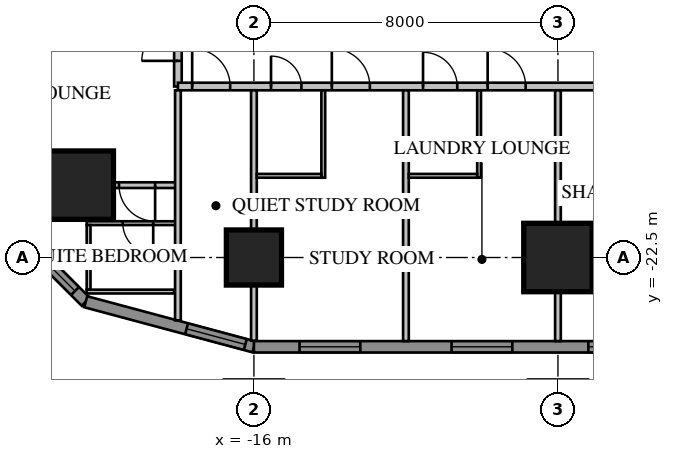
"""IFC4 building model, lengths in metres.
Left out: names, types, materials, properties, quantities, classifications, styles, units other than length and angle.
Written with IfcOpenShell. Run it as: python <this file> out.ifc"""

import sys

from ifc_helpers import new_model, si_unit, direction, frame, frame_2d, origin, origin_2d, place, context, subcontext, project, spatial, rectangle, extrude, element, fill, save


model = new_model("IFC4")
c1 = context("Model", 3, precision=1e-05, world=origin(), true_north=direction((0.0, 1.0)))
c2 = subcontext(c1, "Body", "Model", "MODEL_VIEW")
j1 = project(units=[si_unit("LENGTHUNIT", "METRE"), si_unit("PLANEANGLEUNIT", "RADIAN")], contexts=[c1])
p1 = place(None, origin())
s1 = spatial("IfcSite", under=j1, at=p1, CompositionType="ELEMENT")
p2 = place(p1, origin())
s2 = spatial("IfcBuilding", under=s1, at=p2, CompositionType="ELEMENT")
p3 = place(p2, frame((0.0, 0.0, 42.95)))
s3 = spatial("IfcBuildingStorey", under=s2, at=p3, CompositionType="ELEMENT", Elevation=42.95)
p4 = place(p3, frame((-20.596, -20.596, 0.0), z_axis=(0.0, 0.0, 1.0), x_axis=(1.0, 0.0, 0.0)))
e1 = element("IfcColumn", 1, at=p4, inside=s3, PredefinedType="COLUMN", context=c2, shape_type="SweptSolid", body=[
    extrude(rectangle(XDim=1.8, YDim=1.8, at=origin_2d()), origin(), (0.0, 0.0, 1.0), 3.85),
])
p5 = place(p3, frame((-16.0, -22.5, 0.0), z_axis=(0.0, 0.0, 1.0), x_axis=(1.0, 0.0, 0.0)))
e2 = element("IfcColumn", 2, at=p5, inside=s3, PredefinedType="COLUMN", context=c2, shape_type="SweptSolid", body=[
    extrude(rectangle(XDim=1.45, YDim=1.45, at=origin_2d()), origin(), (0.0, 0.0, 1.0), 3.85),
])
p6 = place(p3, frame((-8.0, -22.5, 0.0), z_axis=(0.0, 0.0, 1.0), x_axis=(1.0, 0.0, 0.0)))
e3 = element("IfcColumn", 3, at=p6, inside=s3, PredefinedType="COLUMN", context=c2, shape_type="SweptSolid", body=[
    extrude(rectangle(XDim=1.8, YDim=1.8, at=origin_2d()), origin(), (0.0, 0.0, 1.0), 3.85),
])
p7 = place(p3, frame((-23.664, -20.425, 0.0), z_axis=(0.0, 0.0, 1.0), x_axis=(0.707106781187, -0.707106781187, 0.0)))
e4 = element("IfcWall", 4, at=p7, inside=s3, PredefinedType="SOLIDWALL", context=c2, shape_type="SweptSolid", body=[
    extrude(rectangle(XDim=4.581, YDim=0.3, at=frame_2d((2.291, 0.0))), origin(), (0.0, 0.0, 1.0), 3.65),
])
p8 = place(p7, frame((0.4, 0.0, 0.75)))
e5 = element("IfcOpeningElement", 5, at=p8, cuts=e4, PredefinedType="OPENING", context=c2, shape_type="SweptSolid", body=[
    extrude(rectangle(XDim=3.781, YDim=1.8, at=frame_2d((1.891, 0.9))), frame((0.0, 0.17, 0.0), z_axis=(0.0, -1.0, 0.0), x_axis=(1.0, 0.0, 0.0)), (0.0, 0.0, 1.0), 0.34),
])
p9 = place(p3, frame((-20.425, -23.664, 0.0), z_axis=(0.0, 0.0, 1.0), x_axis=(0.965920218567, -0.258839972501, 0.0)))
e6 = element("IfcWall", 6, at=p9, inside=s3, PredefinedType="SOLIDWALL", context=c2, shape_type="SweptSolid", body=[
    extrude(rectangle(XDim=4.581, YDim=0.3, at=frame_2d((2.291, 0.0))), origin(), (0.0, 0.0, 1.0), 3.65),
])
p10 = place(p9, frame((2.746, 0.0, 0.75)))
e7 = element("IfcOpeningElement", 7, at=p10, cuts=e6, PredefinedType="OPENING", context=c2, shape_type="SweptSolid", body=[
    extrude(rectangle(XDim=1.6, YDim=1.8, at=frame_2d((0.8, 0.9))), frame((0.0, 0.17, 0.0), z_axis=(0.0, -1.0, 0.0), x_axis=(1.0, 0.0, 0.0)), (0.0, 0.0, 1.0), 0.34),
])
p11 = place(p3, frame((-16.0, -24.85, 0.0), z_axis=(0.0, 0.0, 1.0), x_axis=(1.0, 0.0, 0.0)))
e8 = element("IfcWall", 8, at=p11, inside=s3, PredefinedType="SOLIDWALL", context=c2, shape_type="SweptSolid", body=[
    extrude(rectangle(XDim=32.0, YDim=0.3, at=frame_2d((16.0, 0.0))), origin(), (0.0, 0.0, 1.0), 3.65),
])
p12 = place(p11, frame((1.2, 0.0, 0.75)))
e9 = element("IfcOpeningElement", 9, at=p12, cuts=e8, PredefinedType="OPENING", context=c2, shape_type="SweptSolid", body=[
    extrude(rectangle(XDim=1.6, YDim=1.8, at=frame_2d((0.8, 0.9))), frame((0.0, 0.17, 0.0), z_axis=(0.0, -1.0, 0.0), x_axis=(1.0, 0.0, 0.0)), (0.0, 0.0, 1.0), 0.34),
])
p13 = place(p11, frame((5.2, 0.0, 0.75)))
e10 = element("IfcOpeningElement", 10, at=p13, cuts=e8, PredefinedType="OPENING", context=c2, shape_type="SweptSolid", body=[
    extrude(rectangle(XDim=1.6, YDim=1.8, at=frame_2d((0.8, 0.9))), frame((0.0, 0.17, 0.0), z_axis=(0.0, -1.0, 0.0), x_axis=(1.0, 0.0, 0.0)), (0.0, 0.0, 1.0), 0.34),
])
p14 = place(p11, frame((17.2, 0.0, 0.75)))
e11 = element("IfcOpeningElement", 11, at=p14, cuts=e8, PredefinedType="OPENING", context=c2, shape_type="SweptSolid", body=[
    extrude(rectangle(XDim=1.6, YDim=1.8, at=frame_2d((0.8, 0.9))), frame((0.0, 0.17, 0.0), z_axis=(0.0, -1.0, 0.0), x_axis=(1.0, 0.0, 0.0)), (0.0, 0.0, 1.0), 0.34),
])
p15 = place(p11, frame((21.2, 0.0, 0.75)))
e12 = element("IfcOpeningElement", 12, at=p15, cuts=e8, PredefinedType="OPENING", context=c2, shape_type="SweptSolid", body=[
    extrude(rectangle(XDim=1.6, YDim=1.8, at=frame_2d((0.8, 0.9))), frame((0.0, 0.17, 0.0), z_axis=(0.0, -1.0, 0.0), x_axis=(1.0, 0.0, 0.0)), (0.0, 0.0, 1.0), 0.34),
])
p16 = place(p11, frame((25.2, 0.0, 0.75)))
e13 = element("IfcOpeningElement", 13, at=p16, cuts=e8, PredefinedType="OPENING", context=c2, shape_type="SweptSolid", body=[
    extrude(rectangle(XDim=1.6, YDim=1.8, at=frame_2d((0.8, 0.9))), frame((0.0, 0.17, 0.0), z_axis=(0.0, -1.0, 0.0), x_axis=(1.0, 0.0, 0.0)), (0.0, 0.0, 1.0), 0.34),
])
p17 = place(p11, frame((29.2, 0.0, 0.75)))
e14 = element("IfcOpeningElement", 14, at=p17, cuts=e8, PredefinedType="OPENING", context=c2, shape_type="SweptSolid", body=[
    extrude(rectangle(XDim=1.6, YDim=1.8, at=frame_2d((0.8, 0.9))), frame((0.0, 0.17, 0.0), z_axis=(0.0, -1.0, 0.0), x_axis=(1.0, 0.0, 0.0)), (0.0, 0.0, 1.0), 0.34),
])
p18 = place(p11, frame((8.8, 0.0, 0.75)))
e15 = element("IfcOpeningElement", 15, at=p18, cuts=e8, PredefinedType="OPENING", context=c2, shape_type="SweptSolid", body=[
    extrude(rectangle(XDim=2.4, YDim=1.8, at=frame_2d((1.2, 0.9))), frame((0.0, 0.17, 0.0), z_axis=(0.0, -1.0, 0.0), x_axis=(1.0, 0.0, 0.0)), (0.0, 0.0, 1.0), 0.34),
])
p19 = place(p11, frame((13.812, 0.0, 0.0)))
e16 = element("IfcOpeningElement", 16, at=p19, cuts=e8, PredefinedType="OPENING", context=c2, shape_type="SweptSolid", body=[
    extrude(rectangle(XDim=1.0, YDim=2.4, at=frame_2d((0.5, 1.2))), frame((0.0, 0.17, 0.0), z_axis=(0.0, -1.0, 0.0), x_axis=(1.0, 0.0, 0.0)), (0.0, 0.0, 1.0), 0.34),
])
p20 = place(p3, frame((-18.0, 18.0, 0.0), z_axis=(0.0, 0.0, 1.0), x_axis=(0.0, -1.0, 0.0)))
e17 = element("IfcWall", 17, at=p20, inside=s3, PredefinedType="PARTITIONING", context=c2, shape_type="SweptSolid", body=[
    extrude(rectangle(XDim=36.0, YDim=0.2, at=frame_2d((18.0, 0.0))), origin(), (0.0, 0.0, 1.0), 3.65),
])
p21 = place(p20, frame((0.375, 0.0, 0.0)))
e18 = element("IfcOpeningElement", 18, at=p21, cuts=e17, PredefinedType="OPENING", context=c2, shape_type="SweptSolid", body=[
    extrude(rectangle(XDim=1.0, YDim=2.1, at=frame_2d((0.5, 1.05))), frame((0.0, 0.12, 0.0), z_axis=(0.0, -1.0, 0.0), x_axis=(1.0, 0.0, 0.0)), (0.0, 0.0, 1.0), 0.24),
])
p22 = place(p20, frame((2.375, 0.0, 0.0)))
e19 = element("IfcOpeningElement", 19, at=p22, cuts=e17, PredefinedType="OPENING", context=c2, shape_type="SweptSolid", body=[
    extrude(rectangle(XDim=0.95, YDim=2.1, at=frame_2d((0.475, 1.05))), frame((0.0, 0.12, 0.0), z_axis=(0.0, -1.0, 0.0), x_axis=(1.0, 0.0, 0.0)), (0.0, 0.0, 1.0), 0.24),
])
p23 = place(p20, frame((7.95, 0.0, 0.0)))
e20 = element("IfcOpeningElement", 20, at=p23, cuts=e17, PredefinedType="OPENING", context=c2, shape_type="SweptSolid", body=[
    extrude(rectangle(XDim=0.95, YDim=2.1, at=frame_2d((0.475, 1.05))), frame((0.0, 0.12, 0.0), z_axis=(0.0, -1.0, 0.0), x_axis=(1.0, 0.0, 0.0)), (0.0, 0.0, 1.0), 0.24),
])
p24 = place(p20, frame((18.375, 0.0, 0.0)))
e21 = element("IfcOpeningElement", 21, at=p24, cuts=e17, PredefinedType="OPENING", context=c2, shape_type="SweptSolid", body=[
    extrude(rectangle(XDim=0.95, YDim=2.1, at=frame_2d((0.475, 1.05))), frame((0.0, 0.12, 0.0), z_axis=(0.0, -1.0, 0.0), x_axis=(1.0, 0.0, 0.0)), (0.0, 0.0, 1.0), 0.24),
])
p25 = place(p20, frame((23.95, 0.0, 0.0)))
e22 = element("IfcOpeningElement", 22, at=p25, cuts=e17, PredefinedType="OPENING", context=c2, shape_type="SweptSolid", body=[
    extrude(rectangle(XDim=0.95, YDim=2.1, at=frame_2d((0.475, 1.05))), frame((0.0, 0.12, 0.0), z_axis=(0.0, -1.0, 0.0), x_axis=(1.0, 0.0, 0.0)), (0.0, 0.0, 1.0), 0.24),
])
p26 = place(p20, frame((26.375, 0.0, 0.0)))
e23 = element("IfcOpeningElement", 23, at=p26, cuts=e17, PredefinedType="OPENING", context=c2, shape_type="SweptSolid", body=[
    extrude(rectangle(XDim=0.95, YDim=2.1, at=frame_2d((0.475, 1.05))), frame((0.0, 0.12, 0.0), z_axis=(0.0, -1.0, 0.0), x_axis=(1.0, 0.0, 0.0)), (0.0, 0.0, 1.0), 0.24),
])
p27 = place(p20, frame((31.95, 0.0, 0.0)))
e24 = element("IfcOpeningElement", 24, at=p27, cuts=e17, PredefinedType="OPENING", context=c2, shape_type="SweptSolid", body=[
    extrude(rectangle(XDim=0.95, YDim=2.1, at=frame_2d((0.475, 1.05))), frame((0.0, 0.12, 0.0), z_axis=(0.0, -1.0, 0.0), x_axis=(1.0, 0.0, 0.0)), (0.0, 0.0, 1.0), 0.24),
])
p28 = place(p20, frame((34.375, 0.0, 0.0)))
e25 = element("IfcOpeningElement", 25, at=p28, cuts=e17, PredefinedType="OPENING", context=c2, shape_type="SweptSolid", body=[
    extrude(rectangle(XDim=0.95, YDim=2.1, at=frame_2d((0.475, 1.05))), frame((0.0, 0.12, 0.0), z_axis=(0.0, -1.0, 0.0), x_axis=(1.0, 0.0, 0.0)), (0.0, 0.0, 1.0), 0.24),
])
p29 = place(p20, frame((11.2, 0.0, 0.0)))
e26 = element("IfcOpeningElement", 26, at=p29, cuts=e17, PredefinedType="OPENING", context=c2, shape_type="SweptSolid", body=[
    extrude(rectangle(XDim=1.0, YDim=2.1, at=frame_2d((0.5, 1.05))), frame((0.0, 0.12, 0.0), z_axis=(0.0, -1.0, 0.0), x_axis=(1.0, 0.0, 0.0)), (0.0, 0.0, 1.0), 0.24),
])
p30 = place(p3, frame((-18.065, -21.596, 0.0), z_axis=(0.0, 0.0, 1.0), x_axis=(-1.0, 0.0, 0.0)))
e27 = element("IfcWall", 27, at=p30, inside=s3, PredefinedType="PARTITIONING", context=c2, shape_type="SweptSolid", body=[
    extrude(rectangle(XDim=2.335, YDim=0.1, at=frame_2d((1.167, 0.0))), origin(), (0.0, 0.0, 1.0), 3.65),
])
p31 = place(p30, frame((0.585, 0.0, 0.0)))
e28 = element("IfcOpeningElement", 28, at=p31, cuts=e27, PredefinedType="OPENING", context=c2, shape_type="SweptSolid", body=[
    extrude(rectangle(XDim=0.8, YDim=2.1, at=frame_2d((0.4, 1.05))), frame((0.0, 0.07, 0.0), z_axis=(0.0, -1.0, 0.0), x_axis=(1.0, 0.0, 0.0)), (0.0, 0.0, 1.0), 0.14),
])
p32 = place(p3, frame((-20.35, -21.646, 0.0), z_axis=(0.0, 0.0, 1.0), x_axis=(0.0, -1.0, 0.0)))
e29 = element("IfcWall", 29, at=p32, inside=s3, PredefinedType="PARTITIONING", context=c2, shape_type="SweptSolid", body=[
    extrude(rectangle(XDim=1.7, YDim=0.1, at=frame_2d((0.85, 0.0))), origin(), (0.0, 0.0, 1.0), 3.65),
])
p33 = place(p3, frame((-18.1, -23.396, 0.0), z_axis=(0.0, 0.0, 1.0), x_axis=(-1.0, 0.0, 0.0)))
e30 = element("IfcWall", 30, at=p33, inside=s3, PredefinedType="PARTITIONING", context=c2, shape_type="SweptSolid", body=[
    extrude(rectangle(XDim=2.3, YDim=0.1, at=frame_2d((1.15, 0.0))), origin(), (0.0, 0.0, 1.0), 3.65),
])
p34 = place(p3, frame((-18.065, -20.596, 0.0), z_axis=(0.0, 0.0, 1.0), x_axis=(-1.0, 0.0, 0.0)))
e31 = element("IfcWall", 31, at=p34, inside=s3, PredefinedType="PARTITIONING", context=c2, shape_type="SweptSolid", body=[
    extrude(rectangle(XDim=5.209, YDim=0.15, at=frame_2d((2.604, 0.0))), origin(), (0.0, 0.0, 1.0), 3.65),
])
p35 = place(p34, frame((0.535, 0.0, 0.0)))
e32 = element("IfcOpeningElement", 32, at=p35, cuts=e31, PredefinedType="OPENING", context=c2, shape_type="SweptSolid", body=[
    extrude(rectangle(XDim=0.95, YDim=2.1, at=frame_2d((0.475, 1.05))), frame((0.0, 0.095, 0.0), z_axis=(0.0, -1.0, 0.0), x_axis=(1.0, 0.0, 0.0)), (0.0, 0.0, 1.0), 0.19),
])
p36 = place(p3, frame((-18.0, -18.0, 0.0), z_axis=(0.0, 0.0, 1.0), x_axis=(1.0, 0.0, 0.0)))
e33 = element("IfcWall", 33, at=p36, inside=s3, PredefinedType="PARTITIONING", context=c2, shape_type="SweptSolid", body=[
    extrude(rectangle(XDim=36.0, YDim=0.2, at=frame_2d((18.0, 0.0))), origin(), (0.0, 0.0, 1.0), 3.65),
])
p37 = place(p36, frame((0.375, 0.0, 0.0)))
e34 = element("IfcOpeningElement", 34, at=p37, cuts=e33, PredefinedType="OPENING", context=c2, shape_type="SweptSolid", body=[
    extrude(rectangle(XDim=1.0, YDim=2.1, at=frame_2d((0.5, 1.05))), frame((0.0, 0.12, 0.0), z_axis=(0.0, -1.0, 0.0), x_axis=(1.0, 0.0, 0.0)), (0.0, 0.0, 1.0), 0.24),
])
p38 = place(p36, frame((2.45, 0.0, 0.0)))
e35 = element("IfcOpeningElement", 35, at=p38, cuts=e33, PredefinedType="OPENING", context=c2, shape_type="SweptSolid", body=[
    extrude(rectangle(XDim=0.8, YDim=2.1, at=frame_2d((0.4, 1.05))), frame((0.0, 0.12, 0.0), z_axis=(0.0, -1.0, 0.0), x_axis=(1.0, 0.0, 0.0)), (0.0, 0.0, 1.0), 0.24),
])
p39 = place(p36, frame((4.05, 0.0, 0.0)))
e36 = element("IfcOpeningElement", 36, at=p39, cuts=e33, PredefinedType="OPENING", context=c2, shape_type="SweptSolid", body=[
    extrude(rectangle(XDim=1.0, YDim=2.1, at=frame_2d((0.5, 1.05))), frame((0.0, 0.12, 0.0), z_axis=(0.0, -1.0, 0.0), x_axis=(1.0, 0.0, 0.0)), (0.0, 0.0, 1.0), 0.24),
])
p40 = place(p36, frame((6.45, 0.0, 0.0)))
e37 = element("IfcOpeningElement", 37, at=p40, cuts=e33, PredefinedType="OPENING", context=c2, shape_type="SweptSolid", body=[
    extrude(rectangle(XDim=0.9, YDim=2.1, at=frame_2d((0.45, 1.05))), frame((0.0, 0.12, 0.0), z_axis=(0.0, -1.0, 0.0), x_axis=(1.0, 0.0, 0.0)), (0.0, 0.0, 1.0), 0.24),
])
p41 = place(p36, frame((8.15, 0.0, 0.0)))
e38 = element("IfcOpeningElement", 38, at=p41, cuts=e33, PredefinedType="OPENING", context=c2, shape_type="SweptSolid", body=[
    extrude(rectangle(XDim=1.0, YDim=2.1, at=frame_2d((0.5, 1.05))), frame((0.0, 0.12, 0.0), z_axis=(0.0, -1.0, 0.0), x_axis=(1.0, 0.0, 0.0)), (0.0, 0.0, 1.0), 0.24),
])
p42 = place(p36, frame((19.95, 0.0, 0.0)))
e39 = element("IfcOpeningElement", 39, at=p42, cuts=e33, PredefinedType="OPENING", context=c2, shape_type="SweptSolid", body=[
    extrude(rectangle(XDim=0.95, YDim=2.1, at=frame_2d((0.475, 1.05))), frame((0.0, 0.12, 0.0), z_axis=(0.0, -1.0, 0.0), x_axis=(1.0, 0.0, 0.0)), (0.0, 0.0, 1.0), 0.24),
])
p43 = place(p36, frame((23.95, 0.0, 0.0)))
e40 = element("IfcOpeningElement", 40, at=p43, cuts=e33, PredefinedType="OPENING", context=c2, shape_type="SweptSolid", body=[
    extrude(rectangle(XDim=0.95, YDim=2.1, at=frame_2d((0.475, 1.05))), frame((0.0, 0.12, 0.0), z_axis=(0.0, -1.0, 0.0), x_axis=(1.0, 0.0, 0.0)), (0.0, 0.0, 1.0), 0.24),
])
p44 = place(p36, frame((27.95, 0.0, 0.0)))
e41 = element("IfcOpeningElement", 41, at=p44, cuts=e33, PredefinedType="OPENING", context=c2, shape_type="SweptSolid", body=[
    extrude(rectangle(XDim=0.95, YDim=2.1, at=frame_2d((0.475, 1.05))), frame((0.0, 0.12, 0.0), z_axis=(0.0, -1.0, 0.0), x_axis=(1.0, 0.0, 0.0)), (0.0, 0.0, 1.0), 0.24),
])
p45 = place(p36, frame((31.95, 0.0, 0.0)))
e42 = element("IfcOpeningElement", 42, at=p45, cuts=e33, PredefinedType="OPENING", context=c2, shape_type="SweptSolid", body=[
    extrude(rectangle(XDim=0.95, YDim=2.1, at=frame_2d((0.475, 1.05))), frame((0.0, 0.12, 0.0), z_axis=(0.0, -1.0, 0.0), x_axis=(1.0, 0.0, 0.0)), (0.0, 0.0, 1.0), 0.24),
])
p46 = place(p36, frame((34.375, 0.0, 0.0)))
e43 = element("IfcOpeningElement", 43, at=p46, cuts=e33, PredefinedType="OPENING", context=c2, shape_type="SweptSolid", body=[
    extrude(rectangle(XDim=0.95, YDim=2.1, at=frame_2d((0.475, 1.05))), frame((0.0, 0.12, 0.0), z_axis=(0.0, -1.0, 0.0), x_axis=(1.0, 0.0, 0.0)), (0.0, 0.0, 1.0), 0.24),
])
p47 = place(p36, frame((11.2, 0.0, 0.0)))
e44 = element("IfcOpeningElement", 44, at=p47, cuts=e33, PredefinedType="OPENING", context=c2, shape_type="SweptSolid", body=[
    extrude(rectangle(XDim=1.0, YDim=2.1, at=frame_2d((0.5, 1.05))), frame((0.0, 0.12, 0.0), z_axis=(0.0, -1.0, 0.0), x_axis=(1.0, 0.0, 0.0)), (0.0, 0.0, 1.0), 0.24),
])
p48 = place(p3, frame((-18.0, -18.1, 0.0), z_axis=(0.0, 0.0, 1.0), x_axis=(0.0, -1.0, 0.0)))
e45 = element("IfcWall", 45, at=p48, inside=s3, PredefinedType="PARTITIONING", context=c2, shape_type="SweptSolid", body=[
    extrude(rectangle(XDim=6.053, YDim=0.15, at=frame_2d((3.027, 0.0))), origin(), (0.0, 0.0, 1.0), 3.65),
])
p49 = place(p3, frame((-16.0, -18.1, 0.0), z_axis=(0.0, 0.0, 1.0), x_axis=(0.0, -1.0, 0.0)))
e46 = element("IfcWall", 46, at=p49, inside=s3, PredefinedType="PARTITIONING", context=c2, shape_type="SweptSolid", body=[
    extrude(rectangle(XDim=6.589, YDim=0.15, at=frame_2d((3.295, 0.0))), origin(), (0.0, 0.0, 1.0), 3.65),
])
for number, where, z_axis, x_axis in (
    (47, (-12.0, -18.1, 0.0), (0.0, 0.0, 1.0), (0.0, -1.0, 0.0)),
    (48, (-8.0, -18.1, 0.0), (0.0, 0.0, 1.0), (0.0, -1.0, 0.0)),
):
    element("IfcWall", number, at=place(p3, frame(where, z_axis=z_axis, x_axis=x_axis)), inside=s3, PredefinedType="PARTITIONING", context=c2, shape_type="SweptSolid", body=[
        extrude(rectangle(XDim=6.6, YDim=0.15, at=frame_2d((3.3, 0.0))), origin(), (0.0, 0.0, 1.0), 3.65),
    ])
p50 = place(p3, frame((-14.175, -18.1, 0.0), z_axis=(0.0, 0.0, 1.0), x_axis=(0.0, -1.0, 0.0)))
e49 = element("IfcWall", 49, at=p50, inside=s3, PredefinedType="PARTITIONING", context=c2, shape_type="SweptSolid", body=[
    extrude(rectangle(XDim=2.3, YDim=0.1, at=frame_2d((1.15, 0.0))), origin(), (0.0, 0.0, 1.0), 3.65),
])
p51 = place(p3, frame((-15.925, -20.35, 0.0), z_axis=(0.0, 0.0, 1.0), x_axis=(1.0, 0.0, 0.0)))
e50 = element("IfcWall", 50, at=p51, inside=s3, PredefinedType="PARTITIONING", context=c2, shape_type="SweptSolid", body=[
    extrude(rectangle(XDim=1.7, YDim=0.1, at=frame_2d((0.85, 0.0))), origin(), (0.0, 0.0, 1.0), 3.65),
])
p52 = place(p3, frame((-10.075, -18.1, 0.0), z_axis=(0.0, 0.0, 1.0), x_axis=(0.0, -1.0, 0.0)))
e51 = element("IfcWall", 51, at=p52, inside=s3, PredefinedType="PARTITIONING", context=c2, shape_type="SweptSolid", body=[
    extrude(rectangle(XDim=2.3, YDim=0.1, at=frame_2d((1.15, 0.0))), origin(), (0.0, 0.0, 1.0), 3.65),
])
p53 = place(p3, frame((-11.925, -20.35, 0.0), z_axis=(0.0, 0.0, 1.0), x_axis=(1.0, 0.0, 0.0)))
e52 = element("IfcWall", 52, at=p53, inside=s3, PredefinedType="PARTITIONING", context=c2, shape_type="SweptSolid", body=[
    extrude(rectangle(XDim=1.8, YDim=0.1, at=frame_2d((0.9, 0.0))), origin(), (0.0, 0.0, 1.0), 3.65),
])
p54 = place(p8, origin())
e53 = element("IfcWindow", 53, at=p54, inside=s3, PartitioningType="SINGLE_PANEL", PredefinedType="WINDOW", context=c2, shape_type="SweptSolid", body=[
    extrude(rectangle(XDim=3.781, YDim=1.8, at=frame_2d((1.891, 0.9))), frame((0.0, 0.03, 0.0), z_axis=(0.0, -1.0, 0.0), x_axis=(1.0, 0.0, 0.0)), (0.0, 0.0, 1.0), 0.06),
])
fill(e5, e53)
p55 = place(p10, origin())
e54 = element("IfcWindow", 54, at=p55, inside=s3, PartitioningType="SINGLE_PANEL", PredefinedType="WINDOW", context=c2, shape_type="SweptSolid", body=[
    extrude(rectangle(XDim=1.6, YDim=1.8, at=frame_2d((0.8, 0.9))), frame((0.0, 0.03, 0.0), z_axis=(0.0, -1.0, 0.0), x_axis=(1.0, 0.0, 0.0)), (0.0, 0.0, 1.0), 0.06),
])
fill(e7, e54)
p56 = place(p12, origin())
e55 = element("IfcWindow", 55, at=p56, inside=s3, PartitioningType="SINGLE_PANEL", PredefinedType="WINDOW", context=c2, shape_type="SweptSolid", body=[
    extrude(rectangle(XDim=1.6, YDim=1.8, at=frame_2d((0.8, 0.9))), frame((0.0, 0.03, 0.0), z_axis=(0.0, -1.0, 0.0), x_axis=(1.0, 0.0, 0.0)), (0.0, 0.0, 1.0), 0.06),
])
fill(e9, e55)
p57 = place(p13, origin())
e56 = element("IfcWindow", 56, at=p57, inside=s3, PartitioningType="SINGLE_PANEL", PredefinedType="WINDOW", context=c2, shape_type="SweptSolid", body=[
    extrude(rectangle(XDim=1.6, YDim=1.8, at=frame_2d((0.8, 0.9))), frame((0.0, 0.03, 0.0), z_axis=(0.0, -1.0, 0.0), x_axis=(1.0, 0.0, 0.0)), (0.0, 0.0, 1.0), 0.06),
])
fill(e10, e56)
p58 = place(p18, origin())
e57 = element("IfcWindow", 57, at=p58, inside=s3, PartitioningType="SINGLE_PANEL", PredefinedType="WINDOW", context=c2, shape_type="SweptSolid", body=[
    extrude(rectangle(XDim=2.4, YDim=1.8, at=frame_2d((1.2, 0.9))), frame((0.0, 0.03, 0.0), z_axis=(0.0, -1.0, 0.0), x_axis=(1.0, 0.0, 0.0)), (0.0, 0.0, 1.0), 0.06),
])
fill(e15, e57)
p59 = place(p28, origin())
e58 = element("IfcDoor", 58, at=p59, inside=s3, OperationType="SINGLE_SWING_RIGHT", PredefinedType="DOOR", context=c2, shape_type="SweptSolid", body=[
    extrude(rectangle(XDim=0.95, YDim=2.1, at=frame_2d((0.475, 1.05))), frame((0.0, 0.025, 0.0), z_axis=(0.0, -1.0, 0.0), x_axis=(1.0, 0.0, 0.0)), (0.0, 0.0, 1.0), 0.05),
])
fill(e25, e58)
p60 = place(p31, origin())
e59 = element("IfcDoor", 59, at=p60, inside=s3, OperationType="SINGLE_SWING_LEFT", PredefinedType="DOOR", context=c2, shape_type="SweptSolid", body=[
    extrude(rectangle(XDim=0.8, YDim=2.1, at=frame_2d((0.4, 1.05))), frame((0.0, 0.025, 0.0), z_axis=(0.0, -1.0, 0.0), x_axis=(1.0, 0.0, 0.0)), (0.0, 0.0, 1.0), 0.05),
])
fill(e28, e59)
p61 = place(p35, origin())
e60 = element("IfcDoor", 60, at=p61, inside=s3, OperationType="SINGLE_SWING_LEFT", PredefinedType="DOOR", context=c2, shape_type="SweptSolid", body=[
    extrude(rectangle(XDim=0.95, YDim=2.1, at=frame_2d((0.475, 1.05))), frame((0.0, 0.025, 0.0), z_axis=(0.0, -1.0, 0.0), x_axis=(1.0, 0.0, 0.0)), (0.0, 0.0, 1.0), 0.05),
])
fill(e32, e60)
p62 = place(p37, origin())
e61 = element("IfcDoor", 61, at=p62, inside=s3, OperationType="SINGLE_SWING_LEFT", PredefinedType="DOOR", context=c2, shape_type="SweptSolid", body=[
    extrude(rectangle(XDim=1.0, YDim=2.1, at=frame_2d((0.5, 1.05))), frame((0.0, 0.025, 0.0), z_axis=(0.0, -1.0, 0.0), x_axis=(1.0, 0.0, 0.0)), (0.0, 0.0, 1.0), 0.05),
])
fill(e34, e61)
p63 = place(p38, origin())
e62 = element("IfcDoor", 62, at=p63, inside=s3, OperationType="SINGLE_SWING_LEFT", PredefinedType="DOOR", context=c2, shape_type="SweptSolid", body=[
    extrude(rectangle(XDim=0.8, YDim=2.1, at=frame_2d((0.4, 1.05))), frame((0.0, 0.025, 0.0), z_axis=(0.0, -1.0, 0.0), x_axis=(1.0, 0.0, 0.0)), (0.0, 0.0, 1.0), 0.05),
])
fill(e35, e62)
p64 = place(p39, origin())
e63 = element("IfcDoor", 63, at=p64, inside=s3, OperationType="SINGLE_SWING_LEFT", PredefinedType="DOOR", context=c2, shape_type="SweptSolid", body=[
    extrude(rectangle(XDim=1.0, YDim=2.1, at=frame_2d((0.5, 1.05))), frame((0.0, 0.025, 0.0), z_axis=(0.0, -1.0, 0.0), x_axis=(1.0, 0.0, 0.0)), (0.0, 0.0, 1.0), 0.05),
])
fill(e36, e63)
p65 = place(p40, origin())
e64 = element("IfcDoor", 64, at=p65, inside=s3, OperationType="SINGLE_SWING_LEFT", PredefinedType="DOOR", context=c2, shape_type="SweptSolid", body=[
    extrude(rectangle(XDim=0.9, YDim=2.1, at=frame_2d((0.45, 1.05))), frame((0.0, 0.025, 0.0), z_axis=(0.0, -1.0, 0.0), x_axis=(1.0, 0.0, 0.0)), (0.0, 0.0, 1.0), 0.05),
])
fill(e37, e64)
p66 = place(p41, origin())
e65 = element("IfcDoor", 65, at=p66, inside=s3, OperationType="SINGLE_SWING_LEFT", PredefinedType="DOOR", context=c2, shape_type="SweptSolid", body=[
    extrude(rectangle(XDim=1.0, YDim=2.1, at=frame_2d((0.5, 1.05))), frame((0.0, 0.025, 0.0), z_axis=(0.0, -1.0, 0.0), x_axis=(1.0, 0.0, 0.0)), (0.0, 0.0, 1.0), 0.05),
])
fill(e38, e65)
save(model, sys.argv[1])
